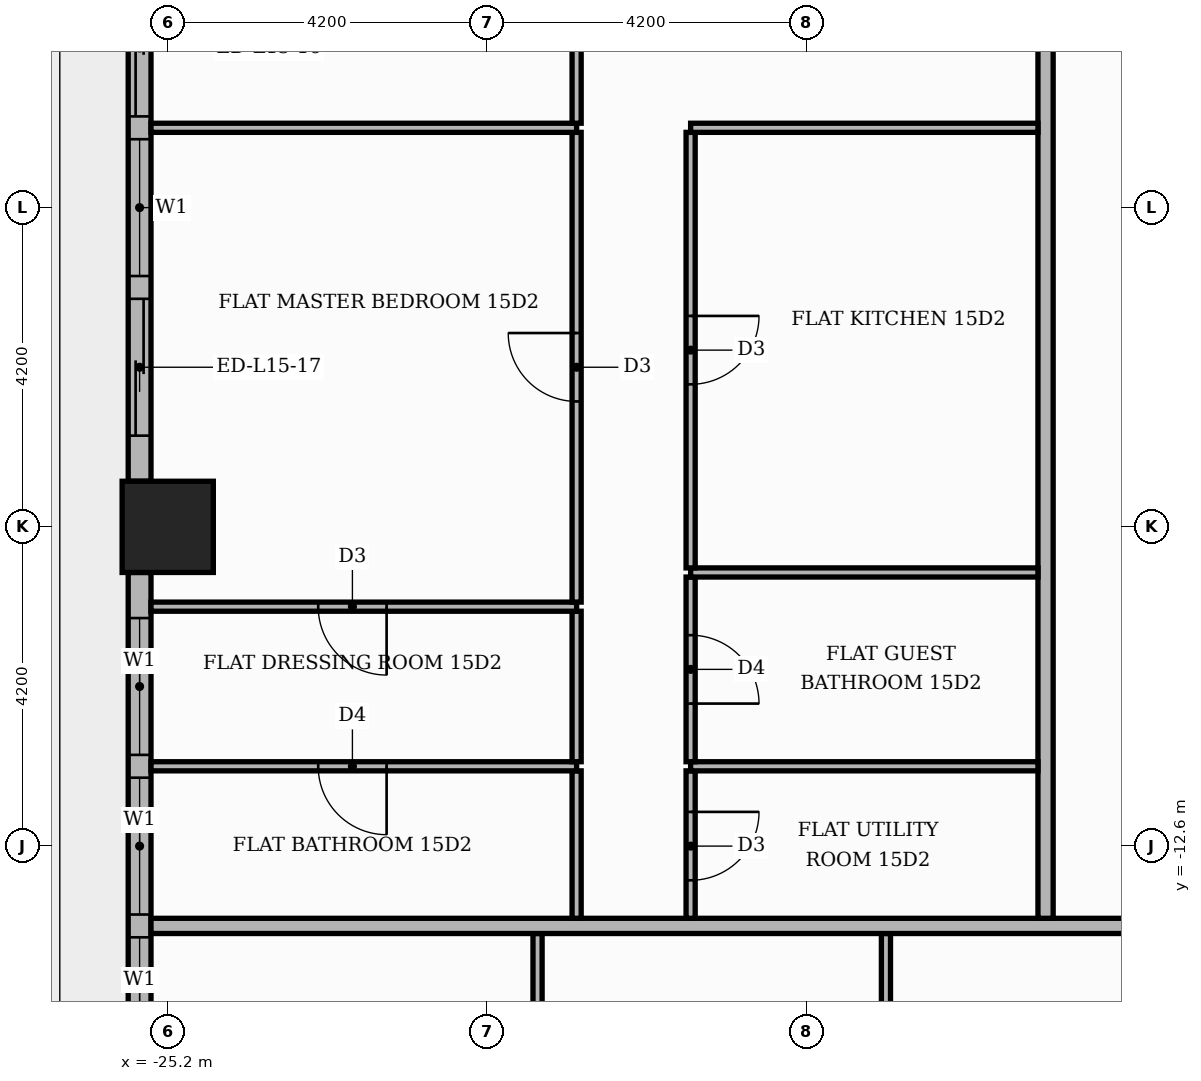
"""IFC4 building model, lengths in metres.
Left out: names, types, materials, properties, quantities, classifications, styles, units other than length and angle.
Written with IfcOpenShell. Run it as: python <this file> out.ifc"""

import sys

from ifc_helpers import new_model, si_unit, direction, frame, frame_2d, origin, origin_2d, place, context, subcontext, project, spatial, rectangle, extrude, element, fill, save


model = new_model("IFC4")
c1 = context("Model", 3, precision=1e-05, world=origin(), true_north=direction((0.0, 1.0)))
c2 = subcontext(c1, "Body", "Model", "MODEL_VIEW")
j1 = project(units=[si_unit("LENGTHUNIT", "METRE"), si_unit("PLANEANGLEUNIT", "RADIAN")], contexts=[c1])
p1 = place(None, origin())
s1 = spatial("IfcSite", under=j1, at=p1, CompositionType="ELEMENT")
p2 = place(p1, origin())
s2 = spatial("IfcBuilding", under=s1, at=p2, CompositionType="ELEMENT")
p3 = place(p2, frame((0.0, 0.0, 66.0)))
s3 = spatial("IfcBuildingStorey", under=s2, at=p3, CompositionType="ELEMENT", Elevation=66.0)
p4 = place(p3, frame((-25.2, -8.4, 0.0), z_axis=(0.0, 0.0, 1.0), x_axis=(1.0, 0.0, 0.0)))
e1 = element("IfcColumn", 1, at=p4, inside=s3, PredefinedType="COLUMN", context=c2, shape_type="SweptSolid", body=[
    extrude(rectangle(XDim=1.2, YDim=1.2, at=origin_2d()), origin(), (0.0, 0.0, 1.0), 3.9),
])
p5 = place(p3, frame((-25.57, -0.6, 0.0), z_axis=(0.0, 0.0, 1.0), x_axis=(0.0, -1.0, 0.0)))
e2 = element("IfcWall", 2, at=p5, inside=s3, PredefinedType="STANDARD", context=c2, shape_type="SweptSolid", body=[
    extrude(rectangle(XDim=7.2, YDim=0.3, at=frame_2d((3.6, 0.0))), origin(), (0.0, 0.0, 1.0), 3.48),
])
p6 = place(p5, frame((0.6, 0.0, 0.0)))
e3 = element("IfcOpeningElement", 3, at=p6, cuts=e2, PredefinedType="OPENING", context=c2, shape_type="SweptSolid", body=[
    extrude(rectangle(XDim=1.8, YDim=2.4, at=frame_2d((0.9, 1.2))), frame((0.0, 0.16, 0.0), z_axis=(0.0, -1.0, 0.0), x_axis=(1.0, 0.0, 0.0)), (0.0, 0.0, 1.0), 0.32),
])
p7 = place(p5, frame((2.7, 0.0, 0.9)))
e4 = element("IfcOpeningElement", 4, at=p7, cuts=e2, PredefinedType="OPENING", context=c2, shape_type="SweptSolid", body=[
    extrude(rectangle(XDim=1.8, YDim=2.1, at=frame_2d((0.9, 1.05))), frame((0.0, 0.16, 0.0), z_axis=(0.0, -1.0, 0.0), x_axis=(1.0, 0.0, 0.0)), (0.0, 0.0, 1.0), 0.32),
])
p8 = place(p5, frame((4.8, 0.0, 0.0)))
e5 = element("IfcOpeningElement", 5, at=p8, cuts=e2, PredefinedType="OPENING", context=c2, shape_type="SweptSolid", body=[
    extrude(rectangle(XDim=1.8, YDim=2.4, at=frame_2d((0.9, 1.2))), frame((0.0, 0.16, 0.0), z_axis=(0.0, -1.0, 0.0), x_axis=(1.0, 0.0, 0.0)), (0.0, 0.0, 1.0), 0.32),
])
p9 = place(p3, frame((-25.57, -9.0, 0.0), z_axis=(0.0, 0.0, 1.0), x_axis=(0.0, -1.0, 0.0)))
e6 = element("IfcWall", 6, at=p9, inside=s3, PredefinedType="STANDARD", context=c2, shape_type="SweptSolid", body=[
    extrude(rectangle(XDim=7.2, YDim=0.3, at=frame_2d((3.6, 0.0))), origin(), (0.0, 0.0, 1.0), 3.48),
])
p10 = place(p9, frame((0.6, 0.0, 0.9)))
e7 = element("IfcOpeningElement", 7, at=p10, cuts=e6, PredefinedType="OPENING", context=c2, shape_type="SweptSolid", body=[
    extrude(rectangle(XDim=1.8, YDim=2.1, at=frame_2d((0.9, 1.05))), frame((0.0, 0.16, 0.0), z_axis=(0.0, -1.0, 0.0), x_axis=(1.0, 0.0, 0.0)), (0.0, 0.0, 1.0), 0.32),
])
p11 = place(p9, frame((2.7, 0.0, 0.9)))
e8 = element("IfcOpeningElement", 8, at=p11, cuts=e6, PredefinedType="OPENING", context=c2, shape_type="SweptSolid", body=[
    extrude(rectangle(XDim=1.8, YDim=2.1, at=frame_2d((0.9, 1.05))), frame((0.0, 0.16, 0.0), z_axis=(0.0, -1.0, 0.0), x_axis=(1.0, 0.0, 0.0)), (0.0, 0.0, 1.0), 0.32),
])
p12 = place(p9, frame((4.8, 0.0, 0.9)))
e9 = element("IfcOpeningElement", 9, at=p12, cuts=e6, PredefinedType="OPENING", context=c2, shape_type="SweptSolid", body=[
    extrude(rectangle(XDim=1.8, YDim=2.1, at=frame_2d((0.9, 1.05))), frame((0.0, 0.16, 0.0), z_axis=(0.0, -1.0, 0.0), x_axis=(1.0, 0.0, 0.0)), (0.0, 0.0, 1.0), 0.32),
])
p13 = place(p3, frame((-20.334, -20.66, 0.0), z_axis=(0.0, 0.0, 1.0), x_axis=(0.0, 1.0, 0.0)))
e10 = element("IfcWall", 10, at=p13, inside=s3, PredefinedType="PARTITIONING", context=c2, shape_type="SweptSolid", body=[
    extrude(rectangle(XDim=6.91, YDim=0.12, at=frame_2d((3.455, 0.0))), origin(), (0.0, 0.0, 1.0), 3.48),
])
p14 = place(p13, frame((4.792, 0.0, 0.0)))
e11 = element("IfcOpeningElement", 11, at=p14, cuts=e10, PredefinedType="OPENING", context=c2, shape_type="SweptSolid", body=[
    extrude(rectangle(XDim=0.9, YDim=2.1, at=frame_2d((0.45, 1.05))), frame((0.0, 0.07, 0.0), z_axis=(0.0, -1.0, 0.0), x_axis=(1.0, 0.0, 0.0)), (0.0, 0.0, 1.0), 0.14),
])
p15 = place(p3, frame((-15.75, -20.66, 0.0), z_axis=(0.0, 0.0, 1.0), x_axis=(0.0, 1.0, 0.0)))
e12 = element("IfcWall", 12, at=p15, inside=s3, PredefinedType="PARTITIONING", context=c2, shape_type="SweptSolid", body=[
    extrude(rectangle(XDim=6.91, YDim=0.12, at=frame_2d((3.455, 0.0))), origin(), (0.0, 0.0, 1.0), 3.48),
])
p16 = place(p15, frame((2.975, 0.0, 0.0)))
e13 = element("IfcOpeningElement", 13, at=p16, cuts=e12, PredefinedType="OPENING", context=c2, shape_type="SweptSolid", body=[
    extrude(rectangle(XDim=1.0, YDim=2.1, at=frame_2d((0.5, 1.05))), frame((0.0, 0.07, 0.0), z_axis=(0.0, -1.0, 0.0), x_axis=(1.0, 0.0, 0.0)), (0.0, 0.0, 1.0), 0.14),
])
p17 = place(p3, frame((-25.42, -13.65, 0.0), z_axis=(0.0, 0.0, 1.0), x_axis=(1.0, 0.0, 0.0)))
e14 = element("IfcWall", 14, at=p17, inside=s3, PredefinedType="PARTITIONING", context=c2, shape_type="SweptSolid", body=[
    extrude(rectangle(XDim=39.07, YDim=0.2, at=frame_2d((19.535, 0.0))), origin(), (0.0, 0.0, 1.0), 3.48),
])
p18 = place(p17, frame((13.32, 0.0, 0.0)))
e15 = element("IfcOpeningElement", 15, at=p18, cuts=e14, PredefinedType="OPENING", context=c2, shape_type="SweptSolid", body=[
    extrude(rectangle(XDim=1.1, YDim=2.4, at=frame_2d((0.55, 1.2))), frame((0.0, 0.11, 0.0), z_axis=(0.0, -1.0, 0.0), x_axis=(1.0, 0.0, 0.0)), (0.0, 0.0, 1.0), 0.22),
])
p19 = place(p17, frame((21.72, 0.0, 0.0)))
e16 = element("IfcOpeningElement", 16, at=p19, cuts=e14, PredefinedType="OPENING", context=c2, shape_type="SweptSolid", body=[
    extrude(rectangle(XDim=1.1, YDim=2.4, at=frame_2d((0.55, 1.2))), frame((0.0, 0.11, 0.0), z_axis=(0.0, -1.0, 0.0), x_axis=(1.0, 0.0, 0.0)), (0.0, 0.0, 1.0), 0.22),
])
p20 = place(p3, frame((-19.82, -13.55, 0.0), z_axis=(0.0, 0.0, 1.0), x_axis=(0.0, 1.0, 0.0)))
e17 = element("IfcWall", 17, at=p20, inside=s3, PredefinedType="PARTITIONING", context=c2, shape_type="SweptSolid", body=[
    extrude(rectangle(XDim=1.94, YDim=0.12, at=frame_2d((0.97, 0.0))), origin(), (0.0, 0.0, 1.0), 3.48),
])
p21 = place(p3, frame((-18.32, -13.55, 0.0), z_axis=(0.0, 0.0, 1.0), x_axis=(0.0, 1.0, 0.0)))
e18 = element("IfcWall", 18, at=p21, inside=s3, PredefinedType="PARTITIONING", context=c2, shape_type="SweptSolid", body=[
    extrude(rectangle(XDim=1.94, YDim=0.12, at=frame_2d((0.97, 0.0))), origin(), (0.0, 0.0, 1.0), 3.48),
])
p22 = place(p21, frame((0.5, 0.0, 0.0)))
e19 = element("IfcOpeningElement", 19, at=p22, cuts=e18, PredefinedType="OPENING", context=c2, shape_type="SweptSolid", body=[
    extrude(rectangle(XDim=0.9, YDim=2.1, at=frame_2d((0.45, 1.05))), frame((0.0, 0.07, 0.0), z_axis=(0.0, -1.0, 0.0), x_axis=(1.0, 0.0, 0.0)), (0.0, 0.0, 1.0), 0.14),
])
p23 = place(p3, frame((-13.65, -13.55, 0.0), z_axis=(0.0, 0.0, 1.0), x_axis=(0.0, 1.0, 0.0)))
e20 = element("IfcWall", 20, at=p23, inside=s3, PredefinedType="PARTITIONING", context=c2, shape_type="SweptSolid", body=[
    extrude(rectangle(XDim=18.7, YDim=0.2, at=frame_2d((9.35, 0.0))), origin(), (0.0, 0.0, 1.0), 3.48),
])
p24 = place(p23, frame((11.95, 0.0, 0.0)))
e21 = element("IfcOpeningElement", 21, at=p24, cuts=e20, PredefinedType="OPENING", context=c2, shape_type="SweptSolid", body=[
    extrude(rectangle(XDim=1.1, YDim=2.4, at=frame_2d((0.55, 1.2))), frame((0.0, 0.11, 0.0), z_axis=(0.0, -1.0, 0.0), x_axis=(1.0, 0.0, 0.0)), (0.0, 0.0, 1.0), 0.22),
])
p25 = place(p3, frame((-25.42, -11.55, 0.0), z_axis=(0.0, 0.0, 1.0), x_axis=(1.0, 0.0, 0.0)))
e22 = element("IfcWall", 22, at=p25, inside=s3, PredefinedType="PARTITIONING", context=c2, shape_type="SweptSolid", body=[
    extrude(rectangle(XDim=5.6, YDim=0.12, at=frame_2d((2.8, 0.0))), origin(), (0.0, 0.0, 1.0), 3.48),
])
p26 = place(p25, frame((2.2, 0.0, 0.0)))
e23 = element("IfcOpeningElement", 23, at=p26, cuts=e22, PredefinedType="OPENING", context=c2, shape_type="SweptSolid", body=[
    extrude(rectangle(XDim=0.9, YDim=2.1, at=frame_2d((0.45, 1.05))), frame((0.0, 0.07, 0.0), z_axis=(0.0, -1.0, 0.0), x_axis=(1.0, 0.0, 0.0)), (0.0, 0.0, 1.0), 0.14),
])
p27 = place(p3, frame((-18.32, -11.55, 0.0), z_axis=(0.0, 0.0, 1.0), x_axis=(1.0, 0.0, 0.0)))
e24 = element("IfcWall", 24, at=p27, inside=s3, PredefinedType="PARTITIONING", context=c2, shape_type="SweptSolid", body=[
    extrude(rectangle(XDim=4.57, YDim=0.12, at=frame_2d((2.285, 0.0))), origin(), (0.0, 0.0, 1.0), 3.48),
])
p28 = place(p3, frame((-19.82, -11.49, 0.0), z_axis=(0.0, 0.0, 1.0), x_axis=(0.0, 1.0, 0.0)))
e25 = element("IfcWall", 25, at=p28, inside=s3, PredefinedType="PARTITIONING", context=c2, shape_type="SweptSolid", body=[
    extrude(rectangle(XDim=1.98, YDim=0.12, at=frame_2d((0.99, 0.0))), origin(), (0.0, 0.0, 1.0), 3.48),
])
p29 = place(p3, frame((-18.32, -11.49, 0.0), z_axis=(0.0, 0.0, 1.0), x_axis=(0.0, 1.0, 0.0)))
e26 = element("IfcWall", 26, at=p29, inside=s3, PredefinedType="PARTITIONING", context=c2, shape_type="SweptSolid", body=[
    extrude(rectangle(XDim=2.43, YDim=0.12, at=frame_2d((1.215, 0.0))), origin(), (0.0, 0.0, 1.0), 3.48),
])
p30 = place(p29, frame((0.765, 0.0, 0.0)))
e27 = element("IfcOpeningElement", 27, at=p30, cuts=e26, PredefinedType="OPENING", context=c2, shape_type="SweptSolid", body=[
    extrude(rectangle(XDim=0.9, YDim=2.1, at=frame_2d((0.45, 1.05))), frame((0.0, 0.07, 0.0), z_axis=(0.0, -1.0, 0.0), x_axis=(1.0, 0.0, 0.0)), (0.0, 0.0, 1.0), 0.14),
])
p31 = place(p3, frame((-25.42, -9.45, 0.0), z_axis=(0.0, 0.0, 1.0), x_axis=(1.0, 0.0, 0.0)))
e28 = element("IfcWall", 28, at=p31, inside=s3, PredefinedType="PARTITIONING", context=c2, shape_type="SweptSolid", body=[
    extrude(rectangle(XDim=5.6, YDim=0.12, at=frame_2d((2.8, 0.0))), origin(), (0.0, 0.0, 1.0), 3.48),
])
p32 = place(p31, frame((2.2, 0.0, 0.0)))
e29 = element("IfcOpeningElement", 29, at=p32, cuts=e28, PredefinedType="OPENING", context=c2, shape_type="SweptSolid", body=[
    extrude(rectangle(XDim=0.9, YDim=2.1, at=frame_2d((0.45, 1.05))), frame((0.0, 0.07, 0.0), z_axis=(0.0, -1.0, 0.0), x_axis=(1.0, 0.0, 0.0)), (0.0, 0.0, 1.0), 0.14),
])
p33 = place(p3, frame((-19.82, -9.39, 0.0), z_axis=(0.0, 0.0, 1.0), x_axis=(0.0, 1.0, 0.0)))
e30 = element("IfcWall", 30, at=p33, inside=s3, PredefinedType="PARTITIONING", context=c2, shape_type="SweptSolid", body=[
    extrude(rectangle(XDim=6.18, YDim=0.12, at=frame_2d((3.09, 0.0))), origin(), (0.0, 0.0, 1.0), 3.48),
])
p34 = place(p33, frame((2.64, 0.0, 0.0)))
e31 = element("IfcOpeningElement", 31, at=p34, cuts=e30, PredefinedType="OPENING", context=c2, shape_type="SweptSolid", body=[
    extrude(rectangle(XDim=0.9, YDim=2.1, at=frame_2d((0.45, 1.05))), frame((0.0, 0.07, 0.0), z_axis=(0.0, -1.0, 0.0), x_axis=(1.0, 0.0, 0.0)), (0.0, 0.0, 1.0), 0.14),
])
p35 = place(p3, frame((-18.32, -9.0, 0.0), z_axis=(0.0, 0.0, 1.0), x_axis=(1.0, 0.0, 0.0)))
e32 = element("IfcWall", 32, at=p35, inside=s3, PredefinedType="PARTITIONING", context=c2, shape_type="SweptSolid", body=[
    extrude(rectangle(XDim=4.57, YDim=0.12, at=frame_2d((2.285, 0.0))), origin(), (0.0, 0.0, 1.0), 3.48),
])
p36 = place(p3, frame((-18.32, -8.94, 0.0), z_axis=(0.0, 0.0, 1.0), x_axis=(0.0, 1.0, 0.0)))
e33 = element("IfcWall", 33, at=p36, inside=s3, PredefinedType="PARTITIONING", context=c2, shape_type="SweptSolid", body=[
    extrude(rectangle(XDim=5.73, YDim=0.12, at=frame_2d((2.865, 0.0))), origin(), (0.0, 0.0, 1.0), 3.48),
])
p37 = place(p36, frame((2.415, 0.0, 0.0)))
e34 = element("IfcOpeningElement", 34, at=p37, cuts=e33, PredefinedType="OPENING", context=c2, shape_type="SweptSolid", body=[
    extrude(rectangle(XDim=0.9, YDim=2.1, at=frame_2d((0.45, 1.05))), frame((0.0, 0.07, 0.0), z_axis=(0.0, -1.0, 0.0), x_axis=(1.0, 0.0, 0.0)), (0.0, 0.0, 1.0), 0.14),
])
p38 = place(p3, frame((-25.42, -3.15, 0.0), z_axis=(0.0, 0.0, 1.0), x_axis=(1.0, 0.0, 0.0)))
e35 = element("IfcWall", 35, at=p38, inside=s3, PredefinedType="PARTITIONING", context=c2, shape_type="SweptSolid", body=[
    extrude(rectangle(XDim=5.6, YDim=0.12, at=frame_2d((2.8, 0.0))), origin(), (0.0, 0.0, 1.0), 3.48),
])
p39 = place(p3, frame((-18.32, -3.15, 0.0), z_axis=(0.0, 0.0, 1.0), x_axis=(1.0, 0.0, 0.0)))
e36 = element("IfcWall", 36, at=p39, inside=s3, PredefinedType="PARTITIONING", context=c2, shape_type="SweptSolid", body=[
    extrude(rectangle(XDim=4.57, YDim=0.12, at=frame_2d((2.285, 0.0))), origin(), (0.0, 0.0, 1.0), 3.48),
])
p40 = place(p3, frame((-19.82, -3.09, 0.0), z_axis=(0.0, 0.0, 1.0), x_axis=(0.0, 1.0, 0.0)))
e37 = element("IfcWall", 37, at=p40, inside=s3, PredefinedType="PARTITIONING", context=c2, shape_type="SweptSolid", body=[
    extrude(rectangle(XDim=8.24, YDim=0.12, at=frame_2d((4.12, 0.0))), origin(), (0.0, 0.0, 1.0), 3.48),
])
p41 = place(p40, frame((3.64, 0.0, 0.0)))
e38 = element("IfcOpeningElement", 38, at=p41, cuts=e37, PredefinedType="OPENING", context=c2, shape_type="SweptSolid", body=[
    extrude(rectangle(XDim=1.0, YDim=2.1, at=frame_2d((0.5, 1.05))), frame((0.0, 0.07, 0.0), z_axis=(0.0, -1.0, 0.0), x_axis=(1.0, 0.0, 0.0)), (0.0, 0.0, 1.0), 0.14),
])
p42 = place(p6, origin())
e39 = element("IfcDoor", 39, at=p42, inside=s3, OperationType="SLIDING_TO_LEFT", PredefinedType="DOOR", context=c2, shape_type="SweptSolid", body=[
    extrude(rectangle(XDim=1.8, YDim=2.4, at=frame_2d((0.9, 1.2))), frame((0.0, 0.025, 0.0), z_axis=(0.0, -1.0, 0.0), x_axis=(1.0, 0.0, 0.0)), (0.0, 0.0, 1.0), 0.05),
])
fill(e3, e39)
p43 = place(p7, origin())
e40 = element("IfcWindow", 40, at=p43, inside=s3, PartitioningType="SINGLE_PANEL", PredefinedType="WINDOW", context=c2, shape_type="SweptSolid", body=[
    extrude(rectangle(XDim=1.8, YDim=2.1, at=frame_2d((0.9, 1.05))), frame((0.0, 0.03, 0.0), z_axis=(0.0, -1.0, 0.0), x_axis=(1.0, 0.0, 0.0)), (0.0, 0.0, 1.0), 0.06),
])
fill(e4, e40)
p44 = place(p8, origin())
e41 = element("IfcDoor", 41, at=p44, inside=s3, OperationType="SLIDING_TO_RIGHT", PredefinedType="DOOR", context=c2, shape_type="SweptSolid", body=[
    extrude(rectangle(XDim=1.8, YDim=2.4, at=frame_2d((0.9, 1.2))), frame((0.0, 0.025, 0.0), z_axis=(0.0, -1.0, 0.0), x_axis=(1.0, 0.0, 0.0)), (0.0, 0.0, 1.0), 0.05),
])
fill(e5, e41)
p45 = place(p10, origin())
e42 = element("IfcWindow", 42, at=p45, inside=s3, PartitioningType="SINGLE_PANEL", PredefinedType="WINDOW", context=c2, shape_type="SweptSolid", body=[
    extrude(rectangle(XDim=1.8, YDim=2.1, at=frame_2d((0.9, 1.05))), frame((0.0, 0.03, 0.0), z_axis=(0.0, -1.0, 0.0), x_axis=(1.0, 0.0, 0.0)), (0.0, 0.0, 1.0), 0.06),
])
fill(e7, e42)
p46 = place(p11, origin())
e43 = element("IfcWindow", 43, at=p46, inside=s3, PartitioningType="SINGLE_PANEL", PredefinedType="WINDOW", context=c2, shape_type="SweptSolid", body=[
    extrude(rectangle(XDim=1.8, YDim=2.1, at=frame_2d((0.9, 1.05))), frame((0.0, 0.03, 0.0), z_axis=(0.0, -1.0, 0.0), x_axis=(1.0, 0.0, 0.0)), (0.0, 0.0, 1.0), 0.06),
])
fill(e8, e43)
p47 = place(p12, origin())
e44 = element("IfcWindow", 44, at=p47, inside=s3, PartitioningType="SINGLE_PANEL", PredefinedType="WINDOW", context=c2, shape_type="SweptSolid", body=[
    extrude(rectangle(XDim=1.8, YDim=2.1, at=frame_2d((0.9, 1.05))), frame((0.0, 0.03, 0.0), z_axis=(0.0, -1.0, 0.0), x_axis=(1.0, 0.0, 0.0)), (0.0, 0.0, 1.0), 0.06),
])
fill(e9, e44)
p48 = place(p37, frame((0.9, 0.0, 0.0), z_axis=(0.0, 0.0, 1.0), x_axis=(-1.0, 0.0, 0.0)))
e45 = element("IfcDoor", 45, at=p48, inside=s3, OperationType="SINGLE_SWING_RIGHT", PredefinedType="DOOR", context=c2, shape_type="SweptSolid", body=[
    extrude(rectangle(XDim=0.9, YDim=2.1, at=frame_2d((0.45, 1.05))), frame((0.0, 0.025, 0.0), z_axis=(0.0, -1.0, 0.0), x_axis=(1.0, 0.0, 0.0)), (0.0, 0.0, 1.0), 0.05),
])
fill(e34, e45)
p49 = place(p30, frame((0.9, 0.0, 0.0), z_axis=(0.0, 0.0, 1.0), x_axis=(-1.0, 0.0, 0.0)))
e46 = element("IfcDoor", 46, at=p49, inside=s3, OperationType="SINGLE_SWING_LEFT", PredefinedType="DOOR", context=c2, shape_type="SweptSolid", body=[
    extrude(rectangle(XDim=0.9, YDim=2.1, at=frame_2d((0.45, 1.05))), frame((0.0, 0.025, 0.0), z_axis=(0.0, -1.0, 0.0), x_axis=(1.0, 0.0, 0.0)), (0.0, 0.0, 1.0), 0.05),
])
fill(e27, e46)
p50 = place(p22, frame((0.9, 0.0, 0.0), z_axis=(0.0, 0.0, 1.0), x_axis=(-1.0, 0.0, 0.0)))
e47 = element("IfcDoor", 47, at=p50, inside=s3, OperationType="SINGLE_SWING_RIGHT", PredefinedType="DOOR", context=c2, shape_type="SweptSolid", body=[
    extrude(rectangle(XDim=0.9, YDim=2.1, at=frame_2d((0.45, 1.05))), frame((0.0, 0.025, 0.0), z_axis=(0.0, -1.0, 0.0), x_axis=(1.0, 0.0, 0.0)), (0.0, 0.0, 1.0), 0.05),
])
fill(e19, e47)
p51 = place(p34, origin())
e48 = element("IfcDoor", 48, at=p51, inside=s3, OperationType="SINGLE_SWING_RIGHT", PredefinedType="DOOR", context=c2, shape_type="SweptSolid", body=[
    extrude(rectangle(XDim=0.9, YDim=2.1, at=frame_2d((0.45, 1.05))), frame((0.0, 0.025, 0.0), z_axis=(0.0, -1.0, 0.0), x_axis=(1.0, 0.0, 0.0)), (0.0, 0.0, 1.0), 0.05),
])
fill(e31, e48)
p52 = place(p32, frame((0.9, 0.0, 0.0), z_axis=(0.0, 0.0, 1.0), x_axis=(-1.0, 0.0, 0.0)))
e49 = element("IfcDoor", 49, at=p52, inside=s3, OperationType="SINGLE_SWING_RIGHT", PredefinedType="DOOR", context=c2, shape_type="SweptSolid", body=[
    extrude(rectangle(XDim=0.9, YDim=2.1, at=frame_2d((0.45, 1.05))), frame((0.0, 0.025, 0.0), z_axis=(0.0, -1.0, 0.0), x_axis=(1.0, 0.0, 0.0)), (0.0, 0.0, 1.0), 0.05),
])
fill(e29, e49)
p53 = place(p26, frame((0.9, 0.0, 0.0), z_axis=(0.0, 0.0, 1.0), x_axis=(-1.0, 0.0, 0.0)))
e50 = element("IfcDoor", 50, at=p53, inside=s3, OperationType="SINGLE_SWING_RIGHT", PredefinedType="DOOR", context=c2, shape_type="SweptSolid", body=[
    extrude(rectangle(XDim=0.9, YDim=2.1, at=frame_2d((0.45, 1.05))), frame((0.0, 0.025, 0.0), z_axis=(0.0, -1.0, 0.0), x_axis=(1.0, 0.0, 0.0)), (0.0, 0.0, 1.0), 0.05),
])
fill(e23, e50)
save(model, sys.argv[1])
